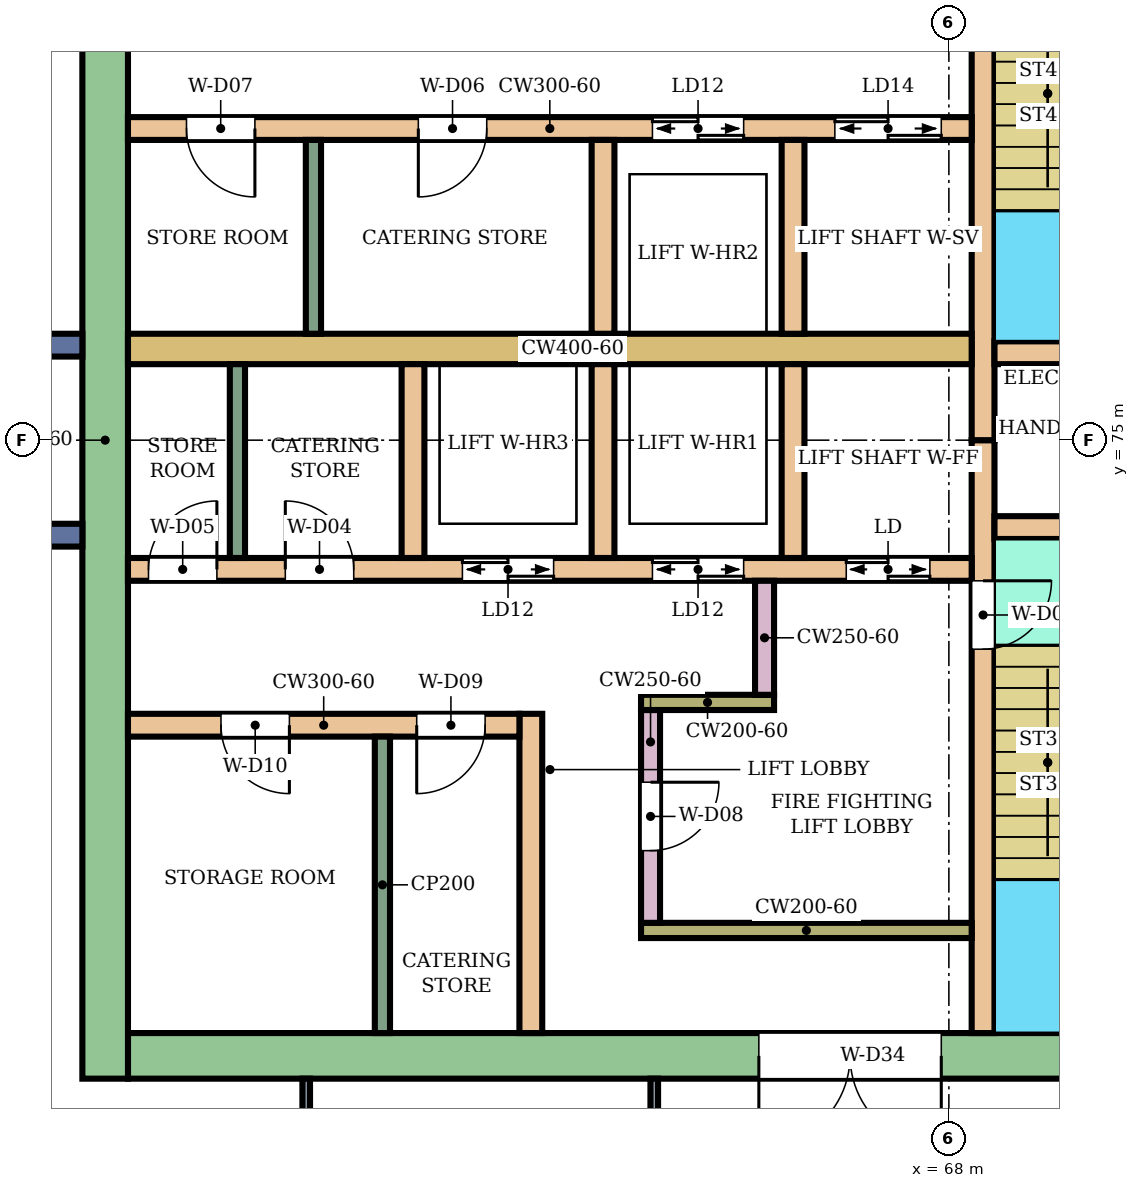
"""IFC4 building model, lengths in metres.
Left out: names, types, materials, properties, quantities, classifications, styles, units other than length and angle.
Written with IfcOpenShell. Run it as: python <this file> out.ifc"""

import sys

from ifc_helpers import new_model, si_unit, direction, frame, frame_2d, origin, place, context, subcontext, project, spatial, rectangle, extrude, element, fill, save


model = new_model("IFC4")
c1 = context("Model", 3, precision=1e-05, world=origin(), true_north=direction((0.0, 1.0)))
c2 = subcontext(c1, "Body", "Model", "MODEL_VIEW")
j1 = project(units=[si_unit("LENGTHUNIT", "METRE"), si_unit("PLANEANGLEUNIT", "RADIAN")], contexts=[c1])
p1 = place(None, origin())
s1 = spatial("IfcSite", under=j1, at=p1, CompositionType="ELEMENT")
p2 = place(p1, origin())
s2 = spatial("IfcBuilding", under=s1, at=p2, CompositionType="ELEMENT")
p3 = place(p2, frame((0.0, 0.0, 229.3)))
s3 = spatial("IfcBuildingStorey", under=s2, at=p3, CompositionType="ELEMENT", Elevation=229.3)
p4 = place(p3, frame((72.1, 66.9, 0.0), z_axis=(0.0, 0.0, 1.0), x_axis=(-1.0, 0.0, 0.0)))
e1 = element("IfcWall", 1, at=p4, inside=s3, PredefinedType="SHEAR", context=c2, shape_type="SweptSolid", body=[
    extrude(rectangle(XDim=14.9, YDim=0.6, at=frame_2d((7.45, 0.0))), origin(), (0.0, 0.0, 1.0), 7.68),
])
p5 = place(p4, frame((4.2, 0.0, 0.0)))
e2 = element("IfcOpeningElement", 2, at=p5, cuts=e1, PredefinedType="OPENING", context=c2, shape_type="SweptSolid", body=[
    extrude(rectangle(XDim=2.4, YDim=2.4, at=frame_2d((1.2, 1.2))), frame((0.0, 0.31, 0.0), z_axis=(0.0, -1.0, 0.0), x_axis=(1.0, 0.0, 0.0)), (0.0, 0.0, 1.0), 0.62),
])
p6 = place(p3, frame((56.9, 83.4, 0.0), z_axis=(0.0, 0.0, 1.0), x_axis=(0.0, -1.0, 0.0)))
e3 = element("IfcWall", 3, at=p6, inside=s3, PredefinedType="SHEAR", context=c2, shape_type="SweptSolid", body=[
    extrude(rectangle(XDim=16.8, YDim=0.6, at=frame_2d((8.4, 0.0))), origin(), (0.0, 0.0, 1.0), 7.68),
])
p7 = place(p3, frame((68.45, 75.0, 0.0), z_axis=(0.0, 0.0, 1.0), x_axis=(0.0, -1.0, 0.0)))
e4 = element("IfcWall", 4, at=p7, inside=s3, PredefinedType="SHEAR", context=c2, shape_type="SweptSolid", body=[
    extrude(rectangle(XDim=7.8, YDim=0.3, at=frame_2d((3.9, 0.0))), origin(), (0.0, 0.0, 1.0), 7.68),
])
p8 = place(p7, frame((1.85, 0.0, 0.0)))
e5 = element("IfcOpeningElement", 5, at=p8, cuts=e4, PredefinedType="OPENING", context=c2, shape_type="SweptSolid", body=[
    extrude(rectangle(XDim=0.9, YDim=2.1, at=frame_2d((0.45, 1.05))), frame((0.0, 0.16, 0.0), z_axis=(0.0, -1.0, 0.0), x_axis=(1.0, 0.0, 0.0)), (0.0, 0.0, 1.0), 0.32),
])
p9 = place(p3, frame((68.45, 82.8, 0.0), z_axis=(0.0, 0.0, 1.0), x_axis=(0.0, -1.0, 0.0)))
e6 = element("IfcWall", 6, at=p9, inside=s3, PredefinedType="SHEAR", context=c2, shape_type="SweptSolid", body=[
    extrude(rectangle(XDim=7.8, YDim=0.3, at=frame_2d((3.9, 0.0))), origin(), (0.0, 0.0, 1.0), 7.68),
])
p10 = place(p9, frame((0.45, 0.0, 0.0)))
e7 = element("IfcOpeningElement", 7, at=p10, cuts=e6, PredefinedType="OPENING", context=c2, shape_type="SweptSolid", body=[
    extrude(rectangle(XDim=0.9, YDim=2.1, at=frame_2d((0.45, 1.05))), frame((0.0, 0.16, 0.0), z_axis=(0.0, -1.0, 0.0), x_axis=(1.0, 0.0, 0.0)), (0.0, 0.0, 1.0), 0.32),
])
p11 = place(p3, frame((71.65, 73.85, 0.0), z_axis=(0.0, 0.0, 1.0), x_axis=(-1.0, 0.0, 0.0)))
e8 = element("IfcWall", 8, at=p11, inside=s3, PredefinedType="SHEAR", context=c2, shape_type="SweptSolid", body=[
    extrude(rectangle(XDim=3.05, YDim=0.3, at=frame_2d((1.525, 0.0))), origin(), (0.0, 0.0, 1.0), 7.68),
])
p12 = place(p11, frame((1.1, 0.0, 0.0)))
e9 = element("IfcOpeningElement", 9, at=p12, cuts=e8, PredefinedType="OPENING", context=c2, shape_type="SweptSolid", body=[
    extrude(rectangle(XDim=0.7, YDim=2.0, at=frame_2d((0.35, 1.0))), frame((0.0, 0.16, 0.0), z_axis=(0.0, -1.0, 0.0), x_axis=(1.0, 0.0, 0.0)), (0.0, 0.0, 1.0), 0.32),
])
p13 = place(p3, frame((71.65, 76.15, 0.0), z_axis=(0.0, 0.0, 1.0), x_axis=(-1.0, 0.0, 0.0)))
e10 = element("IfcWall", 10, at=p13, inside=s3, PredefinedType="SHEAR", context=c2, shape_type="SweptSolid", body=[
    extrude(rectangle(XDim=3.05, YDim=0.3, at=frame_2d((1.525, 0.0))), origin(), (0.0, 0.0, 1.0), 7.68),
])
p14 = place(p3, frame((68.3, 73.3, 0.0), z_axis=(0.0, 0.0, 1.0), x_axis=(-1.0, 0.0, 0.0)))
e11 = element("IfcWall", 11, at=p14, inside=s3, PredefinedType="SHEAR", context=c2, shape_type="SweptSolid", body=[
    extrude(rectangle(XDim=11.1, YDim=0.3, at=frame_2d((5.55, 0.0))), origin(), (0.0, 0.0, 1.0), 7.68),
])
p15 = place(p14, frame((0.55, 0.0, 0.0)))
e12 = element("IfcOpeningElement", 12, at=p15, cuts=e11, PredefinedType="OPENING", context=c2, shape_type="SweptSolid", body=[
    extrude(rectangle(XDim=1.1, YDim=2.1, at=frame_2d((0.55, 1.05))), frame((0.0, 0.16, 0.0), z_axis=(0.0, -1.0, 0.0), x_axis=(1.0, 0.0, 0.0)), (0.0, 0.0, 1.0), 0.32),
])
p16 = place(p14, frame((3.0, 0.0, 0.0)))
e13 = element("IfcOpeningElement", 13, at=p16, cuts=e11, PredefinedType="OPENING", context=c2, shape_type="SweptSolid", body=[
    extrude(rectangle(XDim=1.2, YDim=2.1, at=frame_2d((0.6, 1.05))), frame((0.0, 0.16, 0.0), z_axis=(0.0, -1.0, 0.0), x_axis=(1.0, 0.0, 0.0)), (0.0, 0.0, 1.0), 0.32),
])
p17 = place(p14, frame((5.5, 0.0, 0.0)))
e14 = element("IfcOpeningElement", 14, at=p17, cuts=e11, PredefinedType="OPENING", context=c2, shape_type="SweptSolid", body=[
    extrude(rectangle(XDim=1.2, YDim=2.1, at=frame_2d((0.6, 1.05))), frame((0.0, 0.16, 0.0), z_axis=(0.0, -1.0, 0.0), x_axis=(1.0, 0.0, 0.0)), (0.0, 0.0, 1.0), 0.32),
])
p18 = place(p14, frame((8.13, 0.0, 0.0)))
e15 = element("IfcOpeningElement", 15, at=p18, cuts=e11, PredefinedType="OPENING", context=c2, shape_type="SweptSolid", body=[
    extrude(rectangle(XDim=0.9, YDim=2.1, at=frame_2d((0.45, 1.05))), frame((0.0, 0.16, 0.0), z_axis=(0.0, -1.0, 0.0), x_axis=(1.0, 0.0, 0.0)), (0.0, 0.0, 1.0), 0.32),
])
p19 = place(p14, frame((9.93, 0.0, 0.0)))
e16 = element("IfcOpeningElement", 16, at=p19, cuts=e11, PredefinedType="OPENING", context=c2, shape_type="SweptSolid", body=[
    extrude(rectangle(XDim=0.9, YDim=2.1, at=frame_2d((0.45, 1.05))), frame((0.0, 0.16, 0.0), z_axis=(0.0, -1.0, 0.0), x_axis=(1.0, 0.0, 0.0)), (0.0, 0.0, 1.0), 0.32),
])
p20 = place(p3, frame((68.3, 76.2, 0.0), z_axis=(0.0, 0.0, 1.0), x_axis=(-1.0, 0.0, 0.0)))
e17 = element("IfcWall", 17, at=p20, inside=s3, PredefinedType="SHEAR", context=c2, shape_type="SweptSolid", body=[
    extrude(rectangle(XDim=11.1, YDim=0.4, at=frame_2d((5.55, 0.0))), origin(), (0.0, 0.0, 1.0), 7.68),
])
p21 = place(p3, frame((68.3, 79.1, 0.0), z_axis=(0.0, 0.0, 1.0), x_axis=(-1.0, 0.0, 0.0)))
e18 = element("IfcWall", 18, at=p21, inside=s3, PredefinedType="SHEAR", context=c2, shape_type="SweptSolid", body=[
    extrude(rectangle(XDim=11.1, YDim=0.3, at=frame_2d((5.55, 0.0))), origin(), (0.0, 0.0, 1.0), 7.68),
])
p22 = place(p21, frame((0.4, 0.0, 0.0)))
e19 = element("IfcOpeningElement", 19, at=p22, cuts=e18, PredefinedType="OPENING", context=c2, shape_type="SweptSolid", body=[
    extrude(rectangle(XDim=1.4, YDim=2.1, at=frame_2d((0.7, 1.05))), frame((0.0, 0.16, 0.0), z_axis=(0.0, -1.0, 0.0), x_axis=(1.0, 0.0, 0.0)), (0.0, 0.0, 1.0), 0.32),
])
p23 = place(p21, frame((3.0, 0.0, 0.0)))
e20 = element("IfcOpeningElement", 20, at=p23, cuts=e18, PredefinedType="OPENING", context=c2, shape_type="SweptSolid", body=[
    extrude(rectangle(XDim=1.2, YDim=2.1, at=frame_2d((0.6, 1.05))), frame((0.0, 0.16, 0.0), z_axis=(0.0, -1.0, 0.0), x_axis=(1.0, 0.0, 0.0)), (0.0, 0.0, 1.0), 0.32),
])
p24 = place(p21, frame((6.38, 0.0, 0.0)))
e21 = element("IfcOpeningElement", 21, at=p24, cuts=e18, PredefinedType="OPENING", context=c2, shape_type="SweptSolid", body=[
    extrude(rectangle(XDim=0.9, YDim=2.1, at=frame_2d((0.45, 1.05))), frame((0.0, 0.16, 0.0), z_axis=(0.0, -1.0, 0.0), x_axis=(1.0, 0.0, 0.0)), (0.0, 0.0, 1.0), 0.32),
])
p25 = place(p21, frame((9.43, 0.0, 0.0)))
e22 = element("IfcOpeningElement", 22, at=p25, cuts=e18, PredefinedType="OPENING", context=c2, shape_type="SweptSolid", body=[
    extrude(rectangle(XDim=0.9, YDim=2.1, at=frame_2d((0.45, 1.05))), frame((0.0, 0.16, 0.0), z_axis=(0.0, -1.0, 0.0), x_axis=(1.0, 0.0, 0.0)), (0.0, 0.0, 1.0), 0.32),
])
for number, where, z_axis, x_axis in (
    (23, (65.95, 76.0, 0.0), (0.0, 0.0, 1.0), (0.0, -1.0, 0.0)),
    (24, (63.45, 76.0, 0.0), (0.0, 0.0, 1.0), (0.0, -1.0, 0.0)),
    (25, (60.95, 76.0, 0.0), (0.0, 0.0, 1.0), (0.0, -1.0, 0.0)),
    (26, (65.95, 78.95, 0.0), (0.0, 0.0, 1.0), (0.0, -1.0, 0.0)),
    (27, (63.45, 78.95, 0.0), (0.0, 0.0, 1.0), (0.0, -1.0, 0.0)),
):
    element("IfcWall", number, at=place(p3, frame(where, z_axis=z_axis, x_axis=x_axis)), inside=s3, PredefinedType="SHEAR", context=c2, shape_type="SweptSolid", body=[
        extrude(rectangle(XDim=2.55, YDim=0.3, at=frame_2d((1.275, 0.0))), origin(), (0.0, 0.0, 1.0), 7.68),
    ])
p26 = place(p3, frame((68.3, 68.55, 0.0), z_axis=(0.0, 0.0, 1.0), x_axis=(-1.0, 0.0, 0.0)))
e28 = element("IfcWall", 28, at=p26, inside=s3, PredefinedType="SHEAR", context=c2, shape_type="SweptSolid", body=[
    extrude(rectangle(XDim=4.35, YDim=0.2, at=frame_2d((2.175, 0.0))), origin(), (0.0, 0.0, 1.0), 7.68),
])
p27 = place(p3, frame((64.075, 71.45, 0.0), z_axis=(0.0, 0.0, 1.0), x_axis=(0.0, -1.0, 0.0)))
e29 = element("IfcWall", 29, at=p27, inside=s3, PredefinedType="SHEAR", context=c2, shape_type="SweptSolid", body=[
    extrude(rectangle(XDim=2.8, YDim=0.25, at=frame_2d((1.4, 0.0))), origin(), (0.0, 0.0, 1.0), 7.68),
])
p28 = place(p27, frame((0.95, 0.0, 0.0)))
e30 = element("IfcOpeningElement", 30, at=p28, cuts=e29, PredefinedType="OPENING", context=c2, shape_type="SweptSolid", body=[
    extrude(rectangle(XDim=0.9, YDim=2.1, at=frame_2d((0.45, 1.05))), frame((0.0, 0.135, 0.0), z_axis=(0.0, -1.0, 0.0), x_axis=(1.0, 0.0, 0.0)), (0.0, 0.0, 1.0), 0.27),
])
p29 = place(p3, frame((65.7, 71.55, 0.0), z_axis=(0.0, 0.0, 1.0), x_axis=(-1.0, 0.0, 0.0)))
e31 = element("IfcWall", 31, at=p29, inside=s3, PredefinedType="SHEAR", context=c2, shape_type="SweptSolid", body=[
    extrude(rectangle(XDim=1.75, YDim=0.2, at=frame_2d((0.875, 0.0))), origin(), (0.0, 0.0, 1.0), 7.68),
])
p30 = place(p3, frame((65.575, 73.15, 0.0), z_axis=(0.0, 0.0, 1.0), x_axis=(0.0, -1.0, 0.0)))
e32 = element("IfcWall", 32, at=p30, inside=s3, PredefinedType="SHEAR", context=c2, shape_type="SweptSolid", body=[
    extrude(rectangle(XDim=1.5, YDim=0.25, at=frame_2d((0.75, 0.0))), origin(), (0.0, 0.0, 1.0), 7.68),
])
p31 = place(p3, frame((62.5, 71.4, 0.0), z_axis=(0.0, 0.0, 1.0), x_axis=(0.0, -1.0, 0.0)))
e33 = element("IfcWall", 33, at=p31, inside=s3, PredefinedType="SHEAR", context=c2, shape_type="SweptSolid", body=[
    extrude(rectangle(XDim=4.2, YDim=0.3, at=frame_2d((2.1, 0.0))), origin(), (0.0, 0.0, 1.0), 7.68),
])
p32 = place(p3, frame((62.35, 71.25, 0.0), z_axis=(0.0, 0.0, 1.0), x_axis=(-1.0, 0.0, 0.0)))
e34 = element("IfcWall", 34, at=p32, inside=s3, PredefinedType="SHEAR", context=c2, shape_type="SweptSolid", body=[
    extrude(rectangle(XDim=5.15, YDim=0.3, at=frame_2d((2.575, 0.0))), origin(), (0.0, 0.0, 1.0), 7.68),
])
p33 = place(p32, frame((0.451, 0.0, 0.0)))
e35 = element("IfcOpeningElement", 35, at=p33, cuts=e34, PredefinedType="OPENING", context=c2, shape_type="SweptSolid", body=[
    extrude(rectangle(XDim=0.9, YDim=2.1, at=frame_2d((0.45, 1.05))), frame((0.0, 0.16, 0.0), z_axis=(0.0, -1.0, 0.0), x_axis=(1.0, 0.0, 0.0)), (0.0, 0.0, 1.0), 0.32),
])
p34 = place(p32, frame((3.026, 0.0, 0.0)))
e36 = element("IfcOpeningElement", 36, at=p34, cuts=e34, PredefinedType="OPENING", context=c2, shape_type="SweptSolid", body=[
    extrude(rectangle(XDim=0.9, YDim=2.1, at=frame_2d((0.45, 1.05))), frame((0.0, 0.16, 0.0), z_axis=(0.0, -1.0, 0.0), x_axis=(1.0, 0.0, 0.0)), (0.0, 0.0, 1.0), 0.32),
])
for number, where, z_axis, x_axis in (
    (37, (56.6, 76.25, 0.0), (0.0, 0.0, 1.0), (-1.0, 0.0, 0.0)),
    (38, (56.6, 73.75, 0.0), (0.0, 0.0, 1.0), (-1.0, 0.0, 0.0)),
):
    element("IfcWall", number, at=place(p3, frame(where, z_axis=z_axis, x_axis=x_axis)), inside=s3, PredefinedType="NOTDEFINED", context=c2, shape_type="SweptSolid", body=[
        extrude(rectangle(XDim=2.416, YDim=0.3, at=frame_2d((1.208, 0.0))), origin(), (0.0, 0.0, 1.0), 8.0),
    ])
p35 = place(p3, frame((59.545, 59.642, 0.0), z_axis=(0.0, 0.0, 1.0), x_axis=(0.0, 1.0, 0.0)))
e39 = element("IfcWall", 39, at=p35, inside=s3, PredefinedType="PARTITIONING", context=c2, shape_type="SweptSolid", body=[
    extrude(rectangle(XDim=6.958, YDim=0.1, at=frame_2d((3.479, 0.0))), origin(), (0.0, 0.0, 1.0), 7.55),
])
p36 = place(p35, frame((3.679, 0.0, 0.0)))
e40 = element("IfcOpeningElement", 40, at=p36, cuts=e39, PredefinedType="OPENING", context=c2, shape_type="SweptSolid", body=[
    extrude(rectangle(XDim=0.8, YDim=2.1, at=frame_2d((0.4, 1.05))), frame((0.0, 0.06, 0.0), z_axis=(0.0, -1.0, 0.0), x_axis=(1.0, 0.0, 0.0)), (0.0, 0.0, 1.0), 0.12),
])
p37 = place(p3, frame((64.124, 58.066, 0.0), z_axis=(0.0, 0.0, 1.0), x_axis=(0.0, 1.0, 0.0)))
e41 = element("IfcWall", 41, at=p37, inside=s3, PredefinedType="PARTITIONING", context=c2, shape_type="SweptSolid", body=[
    extrude(rectangle(XDim=8.534, YDim=0.1, at=frame_2d((4.267, 0.0))), origin(), (0.0, 0.0, 1.0), 7.55),
])
p38 = place(p37, frame((3.817, 0.0, 0.0)))
e42 = element("IfcOpeningElement", 42, at=p38, cuts=e41, PredefinedType="OPENING", context=c2, shape_type="SweptSolid", body=[
    extrude(rectangle(XDim=0.9, YDim=2.1, at=frame_2d((0.45, 1.05))), frame((0.0, 0.06, 0.0), z_axis=(0.0, -1.0, 0.0), x_axis=(1.0, 0.0, 0.0)), (0.0, 0.0, 1.0), 0.12),
])
for number, where, z_axis, x_axis in (
    (43, (58.64, 76.0, 0.0), (0.0, 0.0, 1.0), (0.0, -1.0, 0.0)),
    (44, (59.64, 78.95, 0.0), (0.0, 0.0, 1.0), (0.0, -1.0, 0.0)),
):
    element("IfcWall", number, at=place(p3, frame(where, z_axis=z_axis, x_axis=x_axis)), inside=s3, PredefinedType="PARTITIONING", context=c2, shape_type="SweptSolid", body=[
        extrude(rectangle(XDim=2.55, YDim=0.2, at=frame_2d((1.275, 0.0))), origin(), (0.0, 0.0, 1.0), 7.68),
    ])
p39 = place(p3, frame((60.548, 71.1, 0.0), z_axis=(0.0, 0.0, 1.0), x_axis=(0.0, -1.0, 0.0)))
e45 = element("IfcWall", 45, at=p39, inside=s3, PredefinedType="PARTITIONING", context=c2, shape_type="SweptSolid", body=[
    extrude(rectangle(XDim=3.9, YDim=0.2, at=frame_2d((1.95, 0.0))), origin(), (0.0, 0.0, 1.0), 7.68),
])
p40 = place(p8, origin())
e46 = element("IfcDoor", 46, at=p40, inside=s3, OperationType="SINGLE_SWING_LEFT", PredefinedType="DOOR", context=c2, shape_type="SweptSolid", body=[
    extrude(rectangle(XDim=0.9, YDim=2.1, at=frame_2d((0.45, 1.05))), frame((0.0, 0.025, 0.0), z_axis=(0.0, -1.0, 0.0), x_axis=(1.0, 0.0, 0.0)), (0.0, 0.0, 1.0), 0.05),
])
fill(e5, e46)
p41 = place(p15, origin())
e47 = element("IfcDoor", 47, at=p41, inside=s3, OperationType="DOUBLE_DOOR_SLIDING", PredefinedType="DOOR", context=c2, shape_type="SweptSolid", body=[
    extrude(rectangle(XDim=1.1, YDim=2.1, at=frame_2d((0.55, 1.05))), frame((0.0, 0.025, 0.0), z_axis=(0.0, -1.0, 0.0), x_axis=(1.0, 0.0, 0.0)), (0.0, 0.0, 1.0), 0.05),
])
fill(e12, e47)
p42 = place(p16, origin())
e48 = element("IfcDoor", 48, at=p42, inside=s3, OperationType="DOUBLE_DOOR_SLIDING", PredefinedType="DOOR", context=c2, shape_type="SweptSolid", body=[
    extrude(rectangle(XDim=1.2, YDim=2.1, at=frame_2d((0.6, 1.05))), frame((0.0, 0.025, 0.0), z_axis=(0.0, -1.0, 0.0), x_axis=(1.0, 0.0, 0.0)), (0.0, 0.0, 1.0), 0.05),
])
fill(e13, e48)
p43 = place(p17, origin())
e49 = element("IfcDoor", 49, at=p43, inside=s3, OperationType="DOUBLE_DOOR_SLIDING", PredefinedType="DOOR", context=c2, shape_type="SweptSolid", body=[
    extrude(rectangle(XDim=1.2, YDim=2.1, at=frame_2d((0.6, 1.05))), frame((0.0, 0.025, 0.0), z_axis=(0.0, -1.0, 0.0), x_axis=(1.0, 0.0, 0.0)), (0.0, 0.0, 1.0), 0.05),
])
fill(e14, e49)
p44 = place(p18, frame((0.9, 0.0, 0.0), z_axis=(0.0, 0.0, 1.0), x_axis=(-1.0, 0.0, 0.0)))
e50 = element("IfcDoor", 50, at=p44, inside=s3, OperationType="SINGLE_SWING_LEFT", PredefinedType="DOOR", context=c2, shape_type="SweptSolid", body=[
    extrude(rectangle(XDim=0.9, YDim=2.1, at=frame_2d((0.45, 1.05))), frame((0.0, 0.025, 0.0), z_axis=(0.0, -1.0, 0.0), x_axis=(1.0, 0.0, 0.0)), (0.0, 0.0, 1.0), 0.05),
])
fill(e15, e50)
p45 = place(p19, frame((0.9, 0.0, 0.0), z_axis=(0.0, 0.0, 1.0), x_axis=(-1.0, 0.0, 0.0)))
e51 = element("IfcDoor", 51, at=p45, inside=s3, OperationType="SINGLE_SWING_RIGHT", PredefinedType="DOOR", context=c2, shape_type="SweptSolid", body=[
    extrude(rectangle(XDim=0.9, YDim=2.1, at=frame_2d((0.45, 1.05))), frame((0.0, 0.025, 0.0), z_axis=(0.0, -1.0, 0.0), x_axis=(1.0, 0.0, 0.0)), (0.0, 0.0, 1.0), 0.05),
])
fill(e16, e51)
p46 = place(p22, origin())
e52 = element("IfcDoor", 52, at=p46, inside=s3, OperationType="DOUBLE_DOOR_SLIDING", PredefinedType="DOOR", context=c2, shape_type="SweptSolid", body=[
    extrude(rectangle(XDim=1.4, YDim=2.1, at=frame_2d((0.7, 1.05))), frame((0.0, 0.025, 0.0), z_axis=(0.0, -1.0, 0.0), x_axis=(1.0, 0.0, 0.0)), (0.0, 0.0, 1.0), 0.05),
])
fill(e19, e52)
p47 = place(p23, origin())
e53 = element("IfcDoor", 53, at=p47, inside=s3, OperationType="DOUBLE_DOOR_SLIDING", PredefinedType="DOOR", context=c2, shape_type="SweptSolid", body=[
    extrude(rectangle(XDim=1.2, YDim=2.1, at=frame_2d((0.6, 1.05))), frame((0.0, 0.025, 0.0), z_axis=(0.0, -1.0, 0.0), x_axis=(1.0, 0.0, 0.0)), (0.0, 0.0, 1.0), 0.05),
])
fill(e20, e53)
p48 = place(p24, origin())
e54 = element("IfcDoor", 54, at=p48, inside=s3, OperationType="SINGLE_SWING_RIGHT", PredefinedType="DOOR", context=c2, shape_type="SweptSolid", body=[
    extrude(rectangle(XDim=0.9, YDim=2.1, at=frame_2d((0.45, 1.05))), frame((0.0, 0.025, 0.0), z_axis=(0.0, -1.0, 0.0), x_axis=(1.0, 0.0, 0.0)), (0.0, 0.0, 1.0), 0.05),
])
fill(e21, e54)
p49 = place(p25, origin())
e55 = element("IfcDoor", 55, at=p49, inside=s3, OperationType="SINGLE_SWING_LEFT", PredefinedType="DOOR", context=c2, shape_type="SweptSolid", body=[
    extrude(rectangle(XDim=0.9, YDim=2.1, at=frame_2d((0.45, 1.05))), frame((0.0, 0.025, 0.0), z_axis=(0.0, -1.0, 0.0), x_axis=(1.0, 0.0, 0.0)), (0.0, 0.0, 1.0), 0.05),
])
fill(e22, e55)
p50 = place(p28, origin())
e56 = element("IfcDoor", 56, at=p50, inside=s3, OperationType="SINGLE_SWING_LEFT", PredefinedType="DOOR", context=c2, shape_type="SweptSolid", body=[
    extrude(rectangle(XDim=0.9, YDim=2.1, at=frame_2d((0.45, 1.05))), frame((0.0, 0.025, 0.0), z_axis=(0.0, -1.0, 0.0), x_axis=(1.0, 0.0, 0.0)), (0.0, 0.0, 1.0), 0.05),
])
fill(e30, e56)
p51 = place(p33, origin())
e57 = element("IfcDoor", 57, at=p51, inside=s3, OperationType="SINGLE_SWING_RIGHT", PredefinedType="DOOR", context=c2, shape_type="SweptSolid", body=[
    extrude(rectangle(XDim=0.9, YDim=2.1, at=frame_2d((0.45, 1.05))), frame((0.0, 0.025, 0.0), z_axis=(0.0, -1.0, 0.0), x_axis=(1.0, 0.0, 0.0)), (0.0, 0.0, 1.0), 0.05),
])
fill(e35, e57)
p52 = place(p34, origin())
e58 = element("IfcDoor", 58, at=p52, inside=s3, OperationType="SINGLE_SWING_LEFT", PredefinedType="DOOR", context=c2, shape_type="SweptSolid", body=[
    extrude(rectangle(XDim=0.9, YDim=2.1, at=frame_2d((0.45, 1.05))), frame((0.0, 0.025, 0.0), z_axis=(0.0, -1.0, 0.0), x_axis=(1.0, 0.0, 0.0)), (0.0, 0.0, 1.0), 0.05),
])
fill(e36, e58)
p53 = place(p5, origin())
e59 = element("IfcDoor", 59, at=p53, inside=s3, OperationType="DOUBLE_DOOR_SINGLE_SWING", PredefinedType="DOOR", context=c2, shape_type="SweptSolid", body=[
    extrude(rectangle(XDim=2.4, YDim=2.4, at=frame_2d((1.2, 1.2))), frame((0.0, 0.025, 0.0), z_axis=(0.0, -1.0, 0.0), x_axis=(1.0, 0.0, 0.0)), (0.0, 0.0, 1.0), 0.05),
])
fill(e2, e59)
save(model, sys.argv[1])
